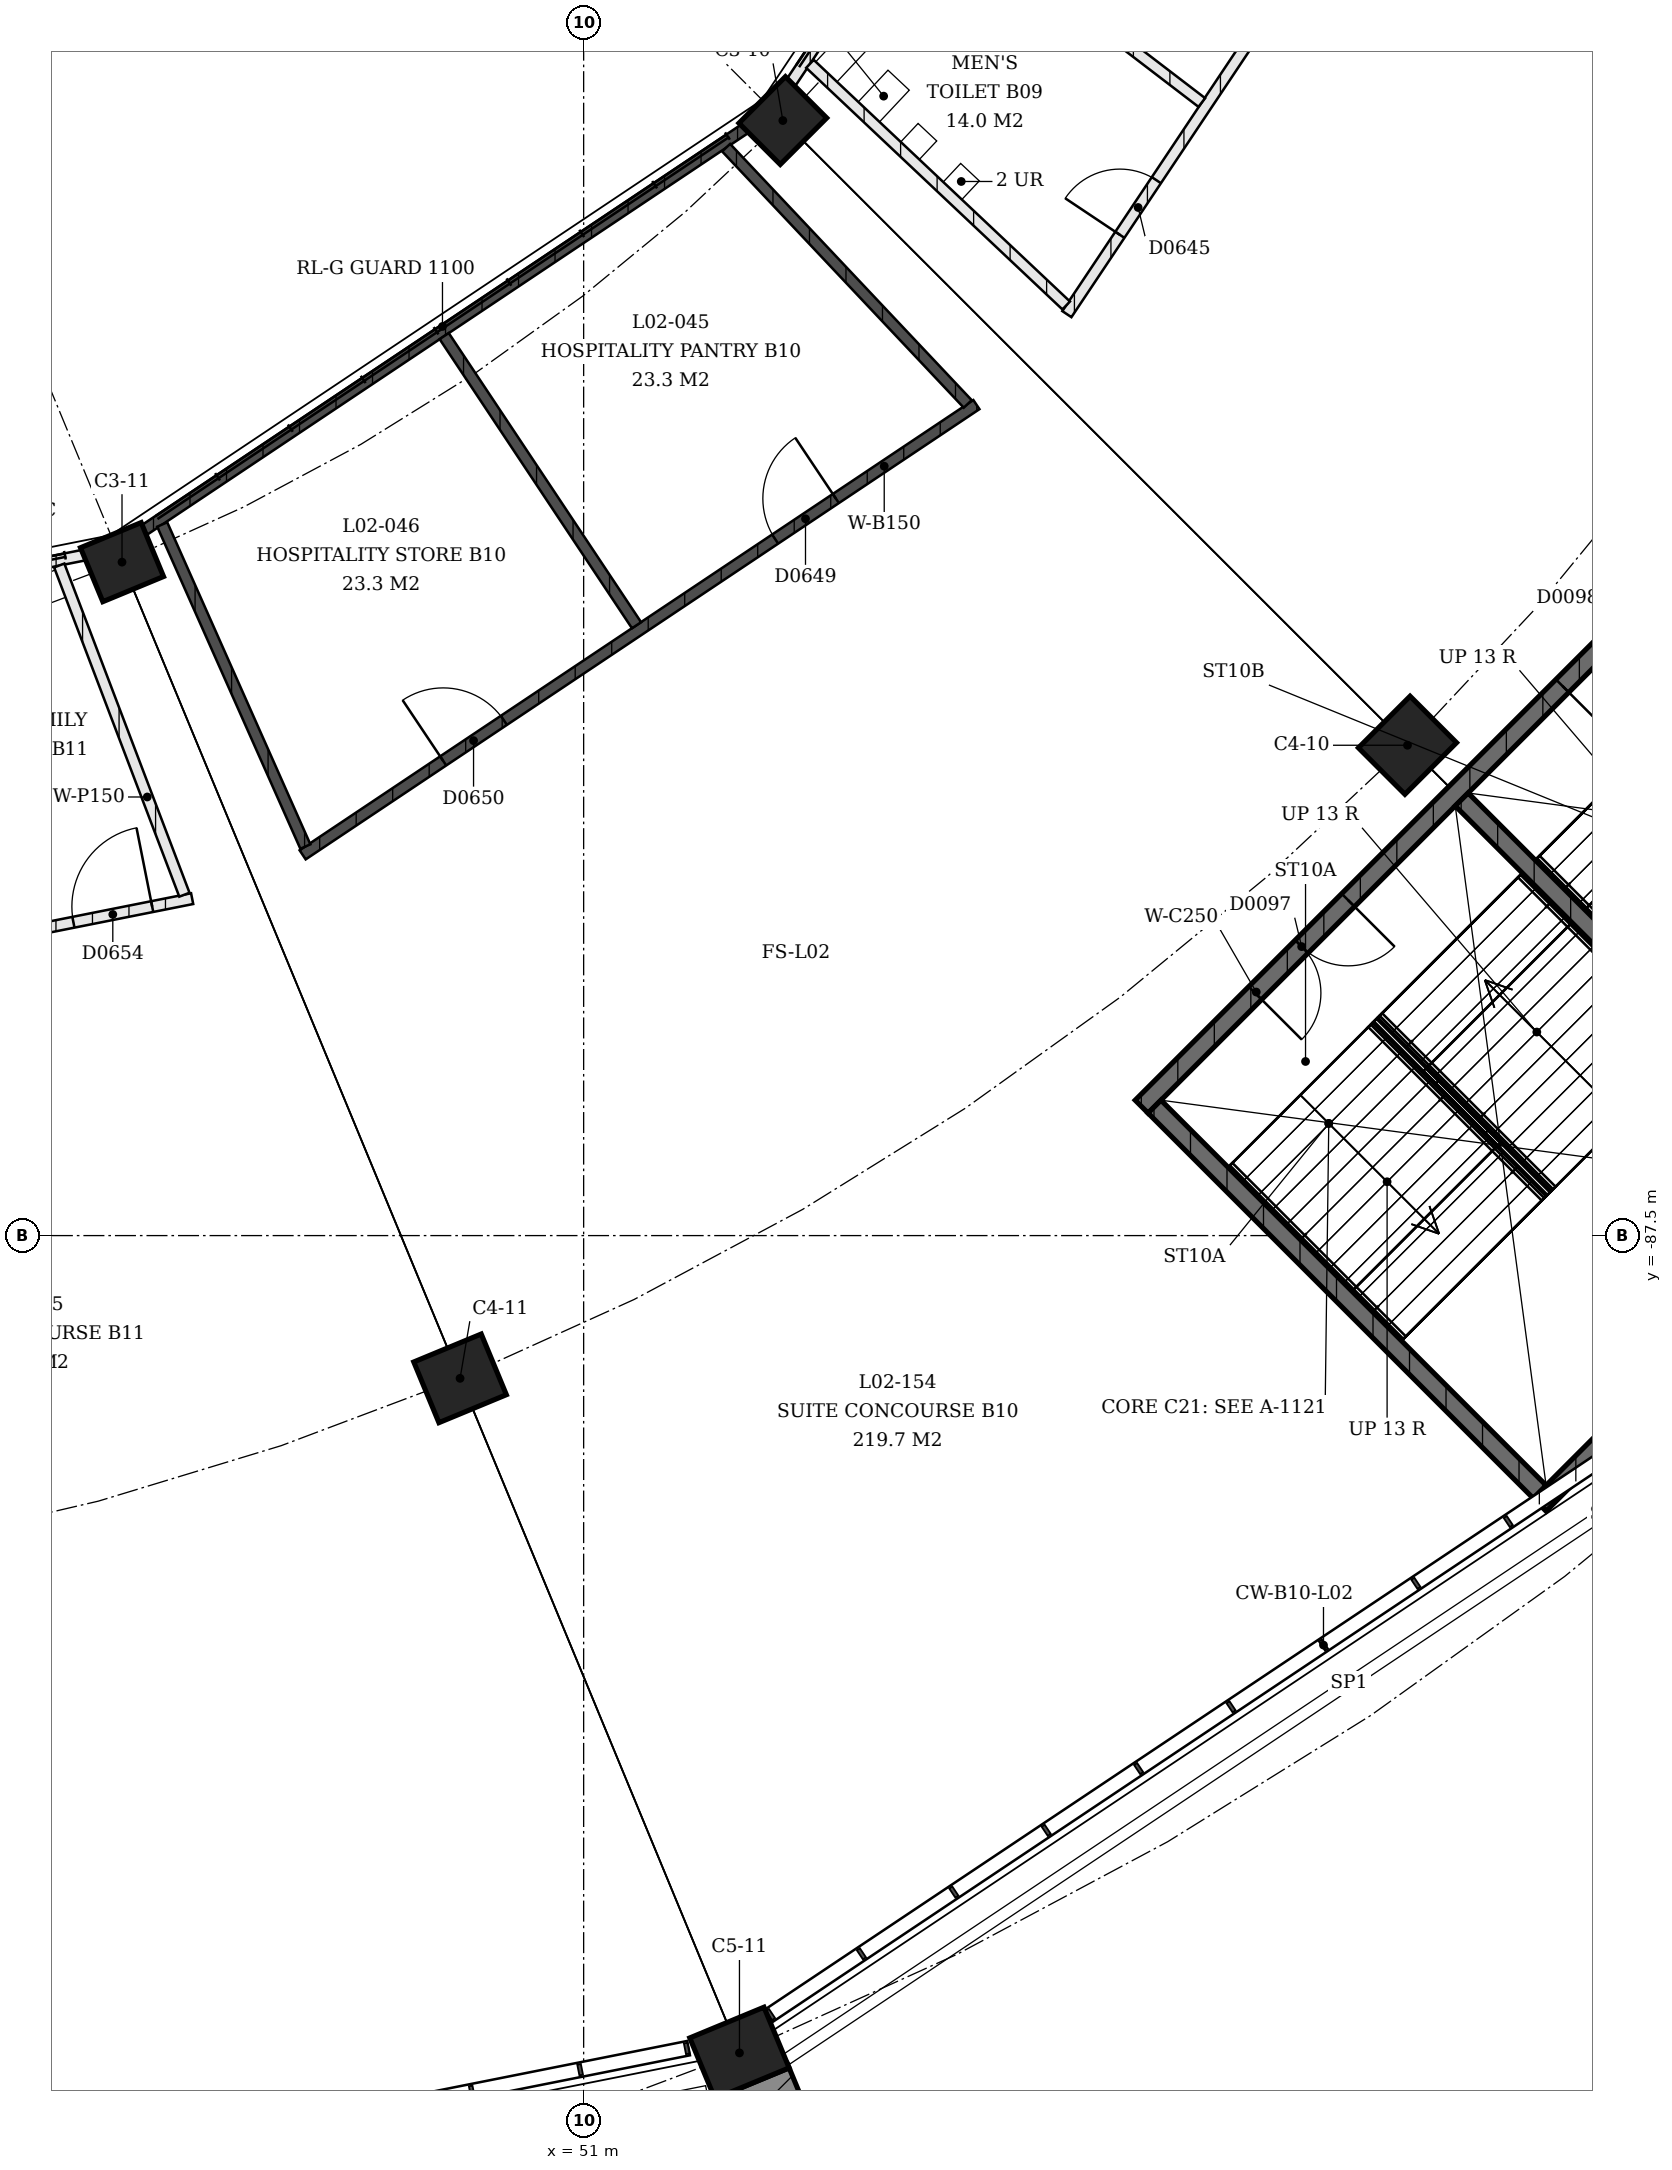
"""IFC4 building model, lengths in metres.
Left out: names, types, materials, properties, quantities, classifications, styles, units other than length and angle.
Written with IfcOpenShell. Run it as: python <this file> out.ifc"""

import sys

from ifc_helpers import new_model, si_unit, direction, frame, frame_2d, origin, origin_2d, place, context, subcontext, project, spatial, rectangle, extrude, element, fill, save


model = new_model("IFC4")
c1 = context("Model", 3, precision=1e-05, world=origin(), true_north=direction((0.0, 1.0)))
c2 = subcontext(c1, "Body", "Model", "MODEL_VIEW")
j1 = project(units=[si_unit("LENGTHUNIT", "METRE"), si_unit("PLANEANGLEUNIT", "RADIAN")], contexts=[c1])
p1 = place(None, origin())
s1 = spatial("IfcSite", under=j1, at=p1, CompositionType="ELEMENT")
p2 = place(p1, origin())
s2 = spatial("IfcBuilding", under=s1, at=p2, CompositionType="ELEMENT")
p3 = place(p2, frame((0.0, 0.0, 9.0)))
s3 = spatial("IfcBuildingStorey", under=s2, at=p3, CompositionType="ELEMENT", Elevation=9.0)
p4 = place(p3, frame((53.728, -72.228, 0.0), z_axis=(0.0, 0.0, 1.0), x_axis=(0.707106781187, 0.707106781187, 0.0)))
e1 = element("IfcColumn", 1, at=p4, inside=s3, PredefinedType="COLUMN", context=c2, shape_type="SweptSolid", body=[
    extrude(rectangle(XDim=0.9, YDim=0.8, at=origin_2d()), origin(), (0.0, 0.0, 1.0), 4.5),
])
p5 = place(p3, frame((62.284, -80.784, 0.0), z_axis=(0.0, 0.0, 1.0), x_axis=(0.707106781187, 0.707106781187, 0.0)))
e2 = element("IfcColumn", 2, at=p5, inside=s3, PredefinedType="COLUMN", context=c2, shape_type="SweptSolid", body=[
    extrude(rectangle(XDim=1.0, YDim=0.9, at=origin_2d()), origin(), (0.0, 0.0, 1.0), 4.5),
])
p6 = place(p3, frame((44.677, -78.276, 0.0), z_axis=(0.0, 0.0, 1.0), x_axis=(0.923879532511, 0.382683432365, 0.0)))
e3 = element("IfcColumn", 3, at=p6, inside=s3, PredefinedType="COLUMN", context=c2, shape_type="SweptSolid", body=[
    extrude(rectangle(XDim=0.9, YDim=0.8, at=origin_2d()), origin(), (0.0, 0.0, 1.0), 4.5),
])
p7 = place(p3, frame((49.307, -89.455, 0.0), z_axis=(0.0, 0.0, 1.0), x_axis=(0.923879532511, 0.382683432365, 0.0)))
e4 = element("IfcColumn", 4, at=p7, inside=s3, PredefinedType="COLUMN", context=c2, shape_type="SweptSolid", body=[
    extrude(rectangle(XDim=1.0, YDim=0.9, at=origin_2d()), origin(), (0.0, 0.0, 1.0), 4.5),
])
p8 = place(p3, frame((53.134, -98.694, 0.0), z_axis=(0.0, 0.0, 1.0), x_axis=(0.923879532511, 0.382683432365, 0.0)))
e5 = element("IfcColumn", 5, at=p8, inside=s3, PredefinedType="COLUMN", context=c2, shape_type="SweptSolid", body=[
    extrude(rectangle(XDim=1.1, YDim=0.9, at=origin_2d()), origin(), (0.0, 0.0, 1.0), 4.5),
])
p9 = place(p3, frame((58.643, -85.734, 0.0), z_axis=(0.0, 0.0, 1.0), x_axis=(0.707106781187, 0.707106781187, 0.0)))
e6 = element("IfcWall", 6, at=p9, inside=s3, PredefinedType="SHEAR", context=c2, shape_type="SweptSolid", body=[
    extrude(rectangle(XDim=12.15, YDim=0.25, at=frame_2d((6.075, 0.0))), origin(), (0.0, 0.0, 1.0), 4.09),
])
p10 = place(p9, frame((2.2, 0.0, 0.0)))
e7 = element("IfcOpeningElement", 7, at=p10, cuts=e6, PredefinedType="OPENING", context=c2, shape_type="SweptSolid", body=[
    extrude(rectangle(XDim=1.8, YDim=2.1, at=frame_2d((0.9, 1.05))), frame((0.0, 0.125, 0.0), z_axis=(0.0, -1.0, 0.0), x_axis=(1.0, 0.0, 0.0)), (0.0, 0.0, 1.0), 0.25),
])
p11 = place(p9, frame((8.15, 0.0, 0.0)))
e8 = element("IfcOpeningElement", 8, at=p11, cuts=e6, PredefinedType="OPENING", context=c2, shape_type="SweptSolid", body=[
    extrude(rectangle(XDim=1.8, YDim=2.1, at=frame_2d((0.9, 1.05))), frame((0.0, 0.125, 0.0), z_axis=(0.0, -1.0, 0.0), x_axis=(1.0, 0.0, 0.0)), (0.0, 0.0, 1.0), 0.25),
])
p12 = place(p3, frame((64.094, -91.186, 0.0), z_axis=(0.0, 0.0, 1.0), x_axis=(0.707106781187, 0.707106781187, 0.0)))
e9 = element("IfcWall", 9, at=p12, inside=s3, PredefinedType="SHEAR", context=c2, shape_type="SweptSolid", body=[
    extrude(rectangle(XDim=12.15, YDim=0.25, at=frame_2d((6.075, 0.0))), origin(), (0.0, 0.0, 1.0), 4.09),
])
p13 = place(p3, frame((58.819, -85.734, 0.0), z_axis=(0.0, 0.0, 1.0), x_axis=(0.707123144286, -0.707090417709, 0.0)))
e10 = element("IfcWall", 10, at=p13, inside=s3, PredefinedType="SHEAR", context=c2, shape_type="SweptSolid", body=[
    extrude(rectangle(XDim=7.46, YDim=0.25, at=frame_2d((3.73, 0.0))), origin(), (0.0, 0.0, 1.0), 4.09),
])
p14 = place(p3, frame((63.027, -81.527, 0.0), z_axis=(0.0, 0.0, 1.0), x_axis=(0.707106781187, -0.707106781187, 0.0)))
e11 = element("IfcWall", 11, at=p14, inside=s3, PredefinedType="SHEAR", context=c2, shape_type="SweptSolid", body=[
    extrude(rectangle(XDim=7.46, YDim=0.25, at=frame_2d((3.73, 0.0))), origin(), (0.0, 0.0, 1.0), 4.09),
])
p15 = place(p3, frame((53.842, -71.705, 0.0), z_axis=(0.0, 0.0, 1.0), x_axis=(0.555582843463, 0.831461186136, 0.0)))
e12 = element("IfcWall", 12, at=p15, inside=s3, PredefinedType="PARTITIONING", context=c2, shape_type="SweptSolid", body=[
    extrude(rectangle(XDim=9.89, YDim=0.15, at=frame_2d((4.945, 0.0))), origin(), (0.0, 0.0, 1.0), 3.0),
])
p16 = place(p3, frame((57.619, -74.88, 0.0), z_axis=(0.0, 0.0, 1.0), x_axis=(0.555577934543, 0.831464466258, 0.0)))
e13 = element("IfcWall", 13, at=p16, inside=s3, PredefinedType="PARTITIONING", context=c2, shape_type="SweptSolid", body=[
    extrude(rectangle(XDim=10.972, YDim=0.15, at=frame_2d((5.486, 0.0))), origin(), (0.0, 0.0, 1.0), 3.0),
])
p17 = place(p16, frame((1.307, 0.0, 0.0)))
e14 = element("IfcOpeningElement", 14, at=p17, cuts=e13, PredefinedType="OPENING", context=c2, shape_type="SweptSolid", body=[
    extrude(rectangle(XDim=0.9, YDim=2.1, at=frame_2d((0.45, 1.05))), frame((0.0, 0.075, 0.0), z_axis=(0.0, -1.0, 0.0), x_axis=(1.0, 0.0, 0.0)), (0.0, 0.0, 1.0), 0.15),
])
p18 = place(p16, frame((4.658, 0.0, 0.0)))
e15 = element("IfcOpeningElement", 15, at=p18, cuts=e13, PredefinedType="OPENING", context=c2, shape_type="SweptSolid", body=[
    extrude(rectangle(XDim=0.9, YDim=2.1, at=frame_2d((0.45, 1.05))), frame((0.0, 0.075, 0.0), z_axis=(0.0, -1.0, 0.0), x_axis=(1.0, 0.0, 0.0)), (0.0, 0.0, 1.0), 0.15),
])
p19 = place(p16, frame((7.26, 0.0, 0.0)))
e16 = element("IfcOpeningElement", 16, at=p19, cuts=e13, PredefinedType="OPENING", context=c2, shape_type="SweptSolid", body=[
    extrude(rectangle(XDim=1.1, YDim=2.1, at=frame_2d((0.55, 1.05))), frame((0.0, 0.075, 0.0), z_axis=(0.0, -1.0, 0.0), x_axis=(1.0, 0.0, 0.0)), (0.0, 0.0, 1.0), 0.15),
])
p20 = place(p16, frame((9.314, 0.0, 0.0)))
e17 = element("IfcOpeningElement", 17, at=p20, cuts=e13, PredefinedType="OPENING", context=c2, shape_type="SweptSolid", body=[
    extrude(rectangle(XDim=1.1, YDim=2.1, at=frame_2d((0.55, 1.05))), frame((0.0, 0.075, 0.0), z_axis=(0.0, -1.0, 0.0), x_axis=(1.0, 0.0, 0.0)), (0.0, 0.0, 1.0), 0.15),
])
p21 = place(p3, frame((54.1, -71.452, 0.0), z_axis=(0.0, 0.0, 1.0), x_axis=(0.727577136184, -0.686025882093, 0.0)))
e18 = element("IfcWall", 18, at=p21, inside=s3, PredefinedType="PARTITIONING", context=c2, shape_type="SweptSolid", body=[
    extrude(rectangle(XDim=4.824, YDim=0.15, at=frame_2d((2.412, 0.0))), origin(), (0.0, 0.0, 1.0), 3.0),
])
p22 = place(p3, frame((55.681, -69.085, 0.0), z_axis=(0.0, 0.0, 1.0), x_axis=(0.794266232117, -0.607569874597, 0.0)))
e19 = element("IfcWall", 19, at=p22, inside=s3, PredefinedType="PARTITIONING", context=c2, shape_type="SweptSolid", body=[
    extrude(rectangle(XDim=4.767, YDim=0.15, at=frame_2d((2.383, 0.0))), origin(), (0.0, 0.0, 1.0), 3.0),
])
p23 = place(p3, frame((53.205, -72.342, 0.0), z_axis=(0.0, 0.0, 1.0), x_axis=(-0.831461186136, -0.555582843463, 0.0)))
e20 = element("IfcWall", 20, at=p23, inside=s3, PredefinedType="SOLIDWALL", context=c2, shape_type="SweptSolid", body=[
    extrude(rectangle(XDim=9.89, YDim=0.15, at=frame_2d((4.945, 0.0))), origin(), (0.0, 0.0, 1.0), 3.0),
])
p24 = place(p3, frame((56.38, -76.119, 0.0), z_axis=(0.0, 0.0, 1.0), x_axis=(-0.831471162003, -0.555567913722, 0.0)))
e21 = element("IfcWall", 21, at=p24, inside=s3, PredefinedType="SOLIDWALL", context=c2, shape_type="SweptSolid", body=[
    extrude(rectangle(XDim=11.099, YDim=0.15, at=frame_2d((5.55, 0.0))), origin(), (0.0, 0.0, 1.0), 3.0),
])
p25 = place(p24, frame((2.315, 0.0, 0.0)))
e22 = element("IfcOpeningElement", 22, at=p25, cuts=e21, PredefinedType="OPENING", context=c2, shape_type="SweptSolid", body=[
    extrude(rectangle(XDim=1.0, YDim=2.1, at=frame_2d((0.5, 1.05))), frame((0.0, 0.075, 0.0), z_axis=(0.0, -1.0, 0.0), x_axis=(1.0, 0.0, 0.0)), (0.0, 0.0, 1.0), 0.15),
])
p26 = place(p24, frame((7.784, 0.0, 0.0)))
e23 = element("IfcOpeningElement", 23, at=p26, cuts=e21, PredefinedType="OPENING", context=c2, shape_type="SweptSolid", body=[
    extrude(rectangle(XDim=1.0, YDim=2.1, at=frame_2d((0.5, 1.05))), frame((0.0, 0.075, 0.0), z_axis=(0.0, -1.0, 0.0), x_axis=(1.0, 0.0, 0.0)), (0.0, 0.0, 1.0), 0.15),
])
p27 = place(p3, frame((52.952, -72.6, 0.0), z_axis=(0.0, 0.0, 1.0), x_axis=(0.686025882093, -0.727577136184, 0.0)))
e24 = element("IfcWall", 24, at=p27, inside=s3, PredefinedType="SOLIDWALL", context=c2, shape_type="SweptSolid", body=[
    extrude(rectangle(XDim=4.824, YDim=0.15, at=frame_2d((2.412, 0.0))), origin(), (0.0, 0.0, 1.0), 3.0),
])
p28 = place(p3, frame((49.09, -75.18, 0.0), z_axis=(0.0, 0.0, 1.0), x_axis=(0.553930112441, -0.832563169093, 0.0)))
e25 = element("IfcWall", 25, at=p28, inside=s3, PredefinedType="SOLIDWALL", context=c2, shape_type="SweptSolid", body=[
    extrude(rectangle(XDim=4.757, YDim=0.15, at=frame_2d((2.378, 0.0))), origin(), (0.0, 0.0, 1.0), 3.0),
])
p29 = place(p3, frame((45.228, -77.761, 0.0), z_axis=(0.0, 0.0, 1.0), x_axis=(0.406147851791, -0.913807377124, 0.0)))
e26 = element("IfcWall", 26, at=p29, inside=s3, PredefinedType="SOLIDWALL", context=c2, shape_type="SweptSolid", body=[
    extrude(rectangle(XDim=4.827, YDim=0.15, at=frame_2d((2.414, 0.0))), origin(), (0.0, 0.0, 1.0), 3.0),
])
p30 = place(p3, frame((34.5, -80.101, 0.0), z_axis=(0.0, 0.0, 1.0), x_axis=(0.980783419557, 0.195099676887, 0.0)))
e27 = element("IfcWall", 27, at=p30, inside=s3, PredefinedType="PARTITIONING", context=c2, shape_type="SweptSolid", body=[
    extrude(rectangle(XDim=9.839, YDim=0.15, at=frame_2d((4.92, 0.0))), origin(), (0.0, 0.0, 1.0), 3.0),
])
p31 = place(p3, frame((34.876, -85.026, 0.0), z_axis=(0.0, 0.0, 1.0), x_axis=(0.980788934186, 0.195071952313, 0.0)))
e28 = element("IfcWall", 28, at=p31, inside=s3, PredefinedType="PARTITIONING", context=c2, shape_type="SweptSolid", body=[
    extrude(rectangle(XDim=10.972, YDim=0.15, at=frame_2d((5.486, 0.0))), origin(), (0.0, 0.0, 1.0), 3.0),
])
p32 = place(p31, frame((1.307, 0.0, 0.0)))
e29 = element("IfcOpeningElement", 29, at=p32, cuts=e28, PredefinedType="OPENING", context=c2, shape_type="SweptSolid", body=[
    extrude(rectangle(XDim=0.9, YDim=2.1, at=frame_2d((0.45, 1.05))), frame((0.0, 0.075, 0.0), z_axis=(0.0, -1.0, 0.0), x_axis=(1.0, 0.0, 0.0)), (0.0, 0.0, 1.0), 0.15),
])
p33 = place(p31, frame((4.658, 0.0, 0.0)))
e30 = element("IfcOpeningElement", 30, at=p33, cuts=e28, PredefinedType="OPENING", context=c2, shape_type="SweptSolid", body=[
    extrude(rectangle(XDim=0.9, YDim=2.1, at=frame_2d((0.45, 1.05))), frame((0.0, 0.075, 0.0), z_axis=(0.0, -1.0, 0.0), x_axis=(1.0, 0.0, 0.0)), (0.0, 0.0, 1.0), 0.15),
])
p34 = place(p31, frame((7.26, 0.0, 0.0)))
e31 = element("IfcOpeningElement", 31, at=p34, cuts=e28, PredefinedType="OPENING", context=c2, shape_type="SweptSolid", body=[
    extrude(rectangle(XDim=1.1, YDim=2.1, at=frame_2d((0.55, 1.05))), frame((0.0, 0.075, 0.0), z_axis=(0.0, -1.0, 0.0), x_axis=(1.0, 0.0, 0.0)), (0.0, 0.0, 1.0), 0.15),
])
p35 = place(p31, frame((9.314, 0.0, 0.0)))
e32 = element("IfcOpeningElement", 32, at=p35, cuts=e28, PredefinedType="OPENING", context=c2, shape_type="SweptSolid", body=[
    extrude(rectangle(XDim=1.1, YDim=2.1, at=frame_2d((0.55, 1.05))), frame((0.0, 0.075, 0.0), z_axis=(0.0, -1.0, 0.0), x_axis=(1.0, 0.0, 0.0)), (0.0, 0.0, 1.0), 0.15),
])
p36 = place(p3, frame((43.817, -78.322, 0.0), z_axis=(0.0, 0.0, 1.0), x_axis=(0.35538492255, -0.934720041951, 0.0)))
e33 = element("IfcWall", 33, at=p36, inside=s3, PredefinedType="PARTITIONING", context=c2, shape_type="SweptSolid", body=[
    extrude(rectangle(XDim=4.824, YDim=0.15, at=frame_2d((2.412, 0.0))), origin(), (0.0, 0.0, 1.0), 3.0),
])
p37 = place(p10, origin())
e34 = element("IfcDoor", 34, at=p37, inside=s3, OperationType="DOUBLE_DOOR_SINGLE_SWING", PredefinedType="DOOR", context=c2, shape_type="SweptSolid", body=[
    extrude(rectangle(XDim=1.8, YDim=2.1, at=frame_2d((0.9, 1.05))), frame((0.0, 0.025, 0.0), z_axis=(0.0, -1.0, 0.0), x_axis=(1.0, 0.0, 0.0)), (0.0, 0.0, 1.0), 0.05),
])
fill(e7, e34)
p38 = place(p11, origin())
e35 = element("IfcDoor", 35, at=p38, inside=s3, OperationType="DOUBLE_DOOR_SINGLE_SWING", PredefinedType="DOOR", context=c2, shape_type="SweptSolid", body=[
    extrude(rectangle(XDim=1.8, YDim=2.1, at=frame_2d((0.9, 1.05))), frame((0.0, 0.025, 0.0), z_axis=(0.0, -1.0, 0.0), x_axis=(1.0, 0.0, 0.0)), (0.0, 0.0, 1.0), 0.05),
])
fill(e8, e35)
p39 = place(p17, origin())
e36 = element("IfcDoor", 36, at=p39, inside=s3, OperationType="SINGLE_SWING_RIGHT", PredefinedType="DOOR", context=c2, shape_type="SweptSolid", body=[
    extrude(rectangle(XDim=0.9, YDim=2.1, at=frame_2d((0.45, 1.05))), frame((0.0, 0.025, 0.0), z_axis=(0.0, -1.0, 0.0), x_axis=(1.0, 0.0, 0.0)), (0.0, 0.0, 1.0), 0.05),
])
fill(e14, e36)
p40 = place(p25, origin())
e37 = element("IfcDoor", 37, at=p40, inside=s3, OperationType="SINGLE_SWING_LEFT", PredefinedType="DOOR", context=c2, shape_type="SweptSolid", body=[
    extrude(rectangle(XDim=1.0, YDim=2.1, at=frame_2d((0.5, 1.05))), frame((0.0, 0.025, 0.0), z_axis=(0.0, -1.0, 0.0), x_axis=(1.0, 0.0, 0.0)), (0.0, 0.0, 1.0), 0.05),
])
fill(e22, e37)
p41 = place(p26, origin())
e38 = element("IfcDoor", 38, at=p41, inside=s3, OperationType="SINGLE_SWING_RIGHT", PredefinedType="DOOR", context=c2, shape_type="SweptSolid", body=[
    extrude(rectangle(XDim=1.0, YDim=2.1, at=frame_2d((0.5, 1.05))), frame((0.0, 0.025, 0.0), z_axis=(0.0, -1.0, 0.0), x_axis=(1.0, 0.0, 0.0)), (0.0, 0.0, 1.0), 0.05),
])
fill(e23, e38)
p42 = place(p35, origin())
e39 = element("IfcDoor", 39, at=p42, inside=s3, OperationType="SINGLE_SWING_LEFT", PredefinedType="DOOR", context=c2, shape_type="SweptSolid", body=[
    extrude(rectangle(XDim=1.1, YDim=2.1, at=frame_2d((0.55, 1.05))), frame((0.0, 0.025, 0.0), z_axis=(0.0, -1.0, 0.0), x_axis=(1.0, 0.0, 0.0)), (0.0, 0.0, 1.0), 0.05),
])
fill(e32, e39)
save(model, sys.argv[1])
